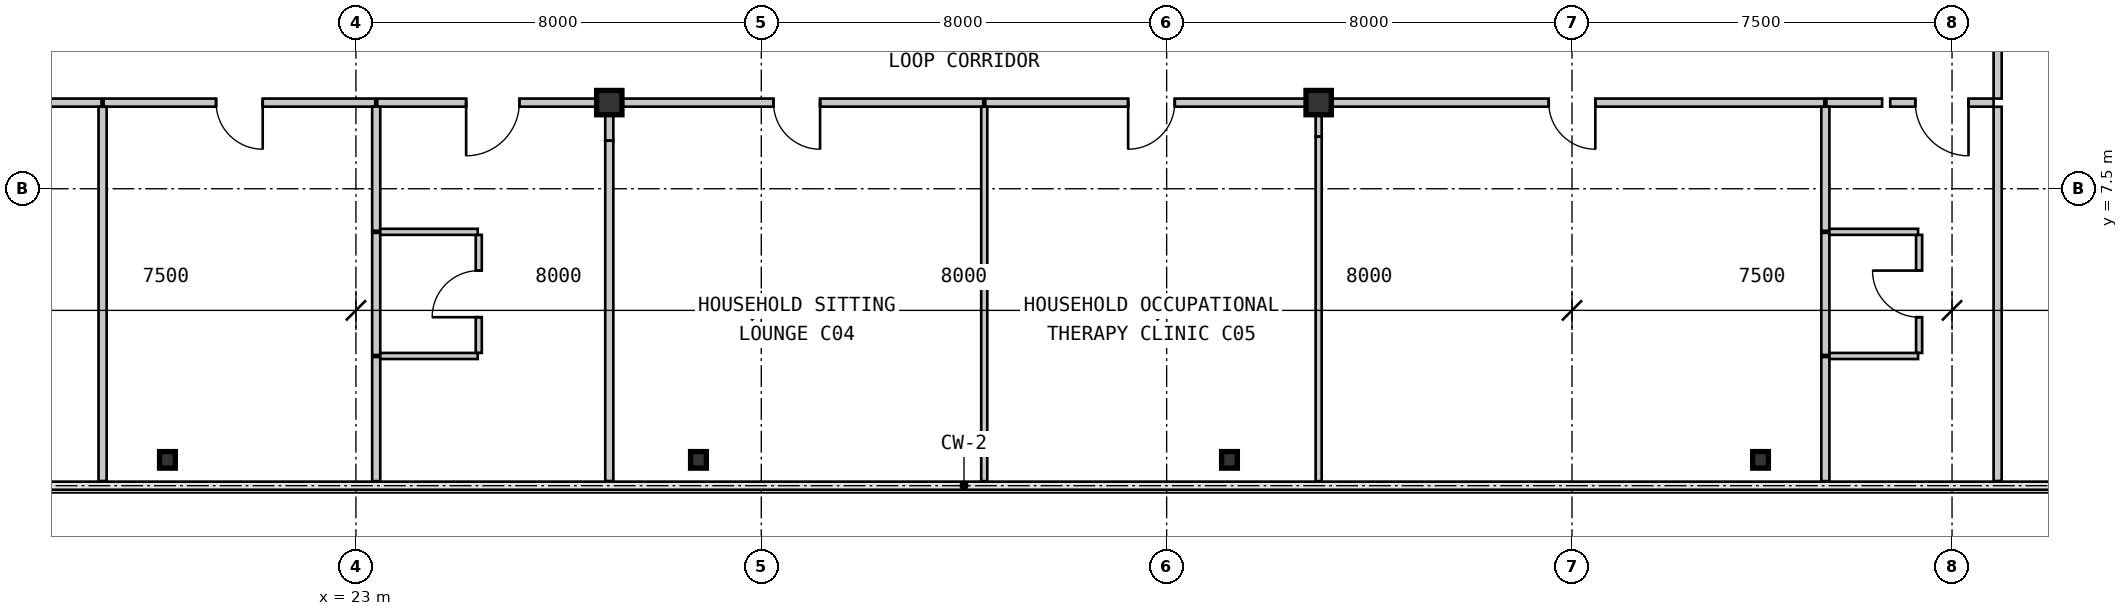
"""IFC4 building model, lengths in metres.
Left out: names, types, materials, properties, quantities, classifications, styles, units other than length and angle.
Written with IfcOpenShell. Run it as: python <this file> out.ifc"""

import sys

from ifc_helpers import new_model, si_unit, direction, frame, frame_2d, origin, origin_2d, place, context, subcontext, project, spatial, rectangle, i_section, extrude, source, transform, mapped, element, fill, save


model = new_model("IFC4")
c1 = context("Model", 3, precision=1e-05, world=origin(), true_north=direction((0.0, 1.0)))
c2 = subcontext(c1, "Body", "Model", "MODEL_VIEW")
j1 = project(units=[si_unit("LENGTHUNIT", "METRE"), si_unit("PLANEANGLEUNIT", "RADIAN")], contexts=[c1])
p1 = place(None, origin())
s1 = spatial("IfcSite", under=j1, at=p1, CompositionType="ELEMENT")
p2 = place(p1, origin())
s2 = spatial("IfcBuilding", under=s1, at=p2, CompositionType="ELEMENT")
p3 = place(p2, frame((0.0, 0.0, 32.55)))
s3 = spatial("IfcBuildingStorey", under=s2, at=p3, CompositionType="ELEMENT", Elevation=32.55)
m1 = source(origin(), c2, "Body", "SweptSolid", [
    extrude(i_section(OverallWidth=0.5, OverallDepth=0.48, WebThickness=0.028, FlangeThickness=0.044, at=origin_2d()), origin(), (0.0, 0.0, 1.0), 3.15),
])
for number, where, z_axis, x_axis in (
    (1, (28.0, 9.2, 0.0), (0.0, 0.0, 1.0), (1.0, 0.0, 0.0)),
    (2, (42.0, 9.2, 0.0), (0.0, 0.0, 1.0), (1.0, 0.0, 0.0)),
):
    element("IfcColumn", number, at=place(p3, frame(where, z_axis=z_axis, x_axis=x_axis)), inside=s3, PredefinedType="COLUMN", context=c2, shape_type="MappedRepresentation", body=[
        mapped(m1, transform((0.0, 0.0, 0.0), scale=1.0)),
    ])
m2 = source(origin(), c2, "Body", "SweptSolid", [
    extrude(i_section(OverallWidth=0.311, OverallDepth=0.327, WebThickness=0.016, FlangeThickness=0.025, at=origin_2d()), origin(), (0.0, 0.0, 1.0), 3.15),
])
for number, where, z_axis, x_axis in (
    (3, (19.28, 2.15, 0.0), (0.0, 0.0, 1.0), (1.0, 0.0, 0.0)),
    (4, (29.76, 2.15, 0.0), (0.0, 0.0, 1.0), (1.0, 0.0, 0.0)),
    (5, (40.24, 2.15, 0.0), (0.0, 0.0, 1.0), (1.0, 0.0, 0.0)),
    (6, (50.72, 2.15, 0.0), (0.0, 0.0, 1.0), (1.0, 0.0, 0.0)),
):
    element("IfcColumn", number, at=place(p3, frame(where, z_axis=z_axis, x_axis=x_axis)), inside=s3, PredefinedType="COLUMN", context=c2, shape_type="MappedRepresentation", body=[
        mapped(m2, transform((0.0, 0.0, 0.0), scale=1.0)),
    ])
m3 = source(origin(), c2, "Body", "SweptSolid", [
    extrude(rectangle(XDim=2.04, YDim=0.16, at=frame_2d((1.02, 0.0))), origin(), (0.0, 0.0, 1.0), 2.93),
])
p4 = place(p3, frame((55.32, 9.2, 0.0), z_axis=(0.0, 0.0, 1.0), x_axis=(-1.0, 0.0, 0.0)))
e7 = element("IfcWall", 7, at=p4, inside=s3, PredefinedType="PARTITIONING", context=c2, shape_type="MappedRepresentation", body=[
    mapped(m3, transform((0.0, 0.0, 0.0), scale=1.0)),
])
m4 = source(origin(), c2, "Body", "SweptSolid", [
    extrude(rectangle(XDim=1.05, YDim=2.1, at=frame_2d((0.525, 1.05))), frame((0.0, 0.09, 0.0), z_axis=(0.0, -1.0, 0.0), x_axis=(1.0, 0.0, 0.0)), (0.0, 0.0, 1.0), 0.18),
])
p5 = place(p4, frame((0.495, 0.0, 0.0)))
e8 = element("IfcOpeningElement", 8, at=p5, cuts=e7, PredefinedType="OPENING", context=c2, shape_type="MappedRepresentation", body=[
    mapped(m4, transform((0.0, 0.0, 0.0), scale=1.0)),
])
m5 = source(origin(), c2, "Body", "SweptSolid", [
    extrude(rectangle(XDim=13.2, YDim=0.16, at=frame_2d((6.6, 0.0))), origin(), (0.0, 0.0, 1.0), 2.93),
])
p6 = place(p3, frame((55.4, 22.48, 0.0), z_axis=(0.0, 0.0, 1.0), x_axis=(0.0, -1.0, 0.0)))
e9 = element("IfcWall", 9, at=p6, inside=s3, PredefinedType="PARTITIONING", context=c2, shape_type="MappedRepresentation", body=[
    mapped(m5, transform((0.0, 0.0, 0.0), scale=1.0)),
])
m6 = source(origin(), c2, "Body", "SweptSolid", [
    extrude(rectangle(XDim=0.92, YDim=2.1, at=frame_2d((0.46, 1.05))), frame((0.0, 0.09, 0.0), z_axis=(0.0, -1.0, 0.0), x_axis=(1.0, 0.0, 0.0)), (0.0, 0.0, 1.0), 0.18),
])
p7 = place(p6, frame((6.14, 0.0, 0.0)))
e10 = element("IfcOpeningElement", 10, at=p7, cuts=e9, PredefinedType="OPENING", context=c2, shape_type="MappedRepresentation", body=[
    mapped(m6, transform((0.0, 0.0, 0.0), scale=1.0)),
])
m7 = source(origin(), c2, "Body", "SweptSolid", [
    extrude(rectangle(XDim=1.1, YDim=0.16, at=frame_2d((0.55, 0.0))), origin(), (0.0, 0.0, 1.0), 2.93),
])
p8 = place(p3, frame((17.98, 9.2, 0.0), z_axis=(0.0, 0.0, 1.0), x_axis=(-1.0, 0.0, 0.0)))
e11 = element("IfcWall", 11, at=p8, inside=s3, PredefinedType="PARTITIONING", context=c2, shape_type="MappedRepresentation", body=[
    mapped(m7, transform((0.0, 0.0, 0.0), scale=1.0)),
])
m8 = source(origin(), c2, "Body", "SweptSolid", [
    extrude(rectangle(XDim=5.36, YDim=0.16, at=frame_2d((2.68, 0.0))), origin(), (0.0, 0.0, 1.0), 2.93),
])
p9 = place(p3, frame((23.38, 9.2, 0.0), z_axis=(0.0, 0.0, 1.0), x_axis=(-1.0, 0.0, 0.0)))
e12 = element("IfcWall", 12, at=p9, inside=s3, PredefinedType="PARTITIONING", context=c2, shape_type="MappedRepresentation", body=[
    mapped(m8, transform((0.0, 0.0, 0.0), scale=1.0)),
])
p10 = place(p9, frame((2.22, 0.0, 0.0)))
e13 = element("IfcOpeningElement", 13, at=p10, cuts=e12, PredefinedType="OPENING", context=c2, shape_type="MappedRepresentation", body=[
    mapped(m6, transform((0.0, 0.0, 0.0), scale=1.0)),
])
m9 = source(origin(), c2, "Body", "SweptSolid", [
    extrude(rectangle(XDim=4.559, YDim=0.16, at=frame_2d((2.28, 0.0))), origin(), (0.0, 0.0, 1.0), 2.93),
])
p11 = place(p3, frame((27.98, 9.2, 0.0), z_axis=(0.0, 0.0, 1.0), x_axis=(-1.0, 0.0, 0.0)))
e14 = element("IfcWall", 14, at=p11, inside=s3, PredefinedType="PARTITIONING", context=c2, shape_type="MappedRepresentation", body=[
    mapped(m9, transform((0.0, 0.0, 0.0), scale=1.0)),
])
p12 = place(p11, frame((1.755, 0.0, 0.0)))
e15 = element("IfcOpeningElement", 15, at=p12, cuts=e14, PredefinedType="OPENING", context=c2, shape_type="MappedRepresentation", body=[
    mapped(m4, transform((0.0, 0.0, 0.0), scale=1.0)),
])
m10 = source(origin(), c2, "Body", "SweptSolid", [
    extrude(rectangle(XDim=7.36, YDim=0.16, at=frame_2d((3.68, 0.0))), origin(), (0.0, 0.0, 1.0), 2.328),
])
p13 = place(p3, frame((35.38, 9.2, 0.0), z_axis=(0.0, 0.0, 1.0), x_axis=(-1.0, 0.0, 0.0)))
e16 = element("IfcWall", 16, at=p13, inside=s3, PredefinedType="PARTITIONING", context=c2, shape_type="MappedRepresentation", body=[
    mapped(m10, transform((0.0, 0.0, 0.0), scale=1.0)),
])
p14 = place(p13, frame((3.22, 0.0, 0.0)))
e17 = element("IfcOpeningElement", 17, at=p14, cuts=e16, PredefinedType="OPENING", context=c2, shape_type="MappedRepresentation", body=[
    mapped(m6, transform((0.0, 0.0, 0.0), scale=1.0)),
])
m11 = source(origin(), c2, "Body", "SweptSolid", [
    extrude(rectangle(XDim=6.56, YDim=0.16, at=frame_2d((3.28, 0.0))), origin(), (0.0, 0.0, 1.0), 2.328),
])
p15 = place(p3, frame((41.98, 9.2, 0.0), z_axis=(0.0, 0.0, 1.0), x_axis=(-1.0, 0.0, 0.0)))
e18 = element("IfcWall", 18, at=p15, inside=s3, PredefinedType="PARTITIONING", context=c2, shape_type="MappedRepresentation", body=[
    mapped(m11, transform((0.0, 0.0, 0.0), scale=1.0)),
])
p16 = place(p15, frame((2.82, 0.0, 0.0)))
e19 = element("IfcOpeningElement", 19, at=p16, cuts=e18, PredefinedType="OPENING", context=c2, shape_type="MappedRepresentation", body=[
    mapped(m6, transform((0.0, 0.0, 0.0), scale=1.0)),
])
m12 = source(origin(), c2, "Body", "SweptSolid", [
    extrude(rectangle(XDim=9.959, YDim=0.16, at=frame_2d((4.98, 0.0))), origin(), (0.0, 0.0, 1.0), 2.93),
])
p17 = place(p3, frame((51.98, 9.2, 0.0), z_axis=(0.0, 0.0, 1.0), x_axis=(-1.0, 0.0, 0.0)))
e20 = element("IfcWall", 20, at=p17, inside=s3, PredefinedType="PARTITIONING", context=c2, shape_type="MappedRepresentation", body=[
    mapped(m12, transform((0.0, 0.0, 0.0), scale=1.0)),
])
p18 = place(p17, frame((4.52, 0.0, 0.0)))
e21 = element("IfcOpeningElement", 21, at=p18, cuts=e20, PredefinedType="OPENING", context=c2, shape_type="MappedRepresentation", body=[
    mapped(m6, transform((0.0, 0.0, 0.0), scale=1.0)),
])
p19 = place(p3, frame((53.12, 9.2, 0.0), z_axis=(0.0, 0.0, 1.0), x_axis=(-1.0, 0.0, 0.0)))
e22 = element("IfcWall", 22, at=p19, inside=s3, PredefinedType="PARTITIONING", context=c2, shape_type="MappedRepresentation", body=[
    mapped(m7, transform((0.0, 0.0, 0.0), scale=1.0)),
])
m13 = source(origin(), c2, "Body", "SweptSolid", [
    extrude(rectangle(XDim=7.386, YDim=0.16, at=frame_2d((3.693, 0.0))), origin(), (0.0, 0.0, 1.0), 2.93),
])
p20 = place(p3, frame((18.0, 9.118, 0.0), z_axis=(0.0, 0.0, 1.0), x_axis=(0.0, -1.0, 0.0)))
e23 = element("IfcWall", 23, at=p20, inside=s3, PredefinedType="PARTITIONING", context=c2, shape_type="MappedRepresentation", body=[
    mapped(m13, transform((0.0, 0.0, 0.0), scale=1.0)),
])
m14 = source(origin(), c2, "Body", "SweptSolid", [
    extrude(rectangle(XDim=2.45, YDim=0.16, at=frame_2d((1.225, 0.0))), origin(), (0.0, 0.0, 1.0), 2.93),
])
p21 = place(p3, frame((23.4, 4.18, 0.0), z_axis=(0.0, 0.0, 1.0), x_axis=(0.0, -1.0, 0.0)))
e24 = element("IfcWall", 24, at=p21, inside=s3, PredefinedType="PARTITIONING", context=c2, shape_type="MappedRepresentation", body=[
    mapped(m14, transform((0.0, 0.0, 0.0), scale=1.0)),
])
m15 = source(origin(), c2, "Body", "SweptSolid", [
    extrude(rectangle(XDim=2.45, YDim=0.16, at=frame_2d((1.225, 0.0))), origin(), (0.0, 0.0, 1.0), 2.93),
])
p22 = place(p3, frame((23.4, 9.12, 0.0), z_axis=(0.0, 0.0, 1.0), x_axis=(0.0, -1.0, 0.0)))
e25 = element("IfcWall", 25, at=p22, inside=s3, PredefinedType="PARTITIONING", context=c2, shape_type="MappedRepresentation", body=[
    mapped(m15, transform((0.0, 0.0, 0.0), scale=1.0)),
])
m16 = source(origin(), c2, "Body", "SweptSolid", [
    extrude(rectangle(XDim=2.41, YDim=0.16, at=frame_2d((1.205, 0.0))), origin(), (0.0, 0.0, 1.0), 2.93),
])
p23 = place(p3, frame((23.4, 6.63, 0.0), z_axis=(0.0, 0.0, 1.0), x_axis=(0.0, -1.0, 0.0)))
e26 = element("IfcWall", 26, at=p23, inside=s3, PredefinedType="PARTITIONING", context=c2, shape_type="MappedRepresentation", body=[
    mapped(m16, transform((0.0, 0.0, 0.0), scale=1.0)),
])
m17 = source(origin(), c2, "Body", "SweptSolid", [
    extrude(rectangle(XDim=2.33, YDim=0.12, at=frame_2d((1.165, 0.0))), origin(), (0.0, 0.0, 1.0), 2.93),
])
p24 = place(p3, frame((25.424, 4.26, 0.0), z_axis=(0.0, 0.0, 1.0), x_axis=(0.0, 1.0, 0.0)))
e27 = element("IfcWall", 27, at=p24, inside=s3, PredefinedType="PARTITIONING", context=c2, shape_type="MappedRepresentation", body=[
    mapped(m17, transform((0.0, 0.0, 0.0), scale=1.0)),
])
m18 = source(origin(), c2, "Body", "SweptSolid", [
    extrude(rectangle(XDim=0.92, YDim=2.1, at=frame_2d((0.46, 1.05))), frame((0.0, 0.07, 0.0), z_axis=(0.0, -1.0, 0.0), x_axis=(1.0, 0.0, 0.0)), (0.0, 0.0, 1.0), 0.14),
])
p25 = place(p24, frame((0.705, 0.0, 0.0)))
e28 = element("IfcOpeningElement", 28, at=p25, cuts=e27, PredefinedType="OPENING", context=c2, shape_type="MappedRepresentation", body=[
    mapped(m18, transform((0.0, 0.0, 0.0), scale=1.0)),
])
m19 = source(origin(), c2, "Body", "SweptSolid", [
    extrude(rectangle(XDim=1.924, YDim=0.12, at=frame_2d((0.962, 0.0))), origin(), (0.0, 0.0, 1.0), 2.93),
])
for number, where, z_axis, x_axis in (
    (29, (23.48, 4.2, 0.0), (0.0, 0.0, 1.0), (1.0, 0.0, 0.0)),
    (30, (25.404, 6.65, 0.0), (0.0, 0.0, 1.0), (-1.0, 0.0, 0.0)),
):
    element("IfcWall", number, at=place(p3, frame(where, z_axis=z_axis, x_axis=x_axis)), inside=s3, PredefinedType="PARTITIONING", context=c2, shape_type="MappedRepresentation", body=[
        mapped(m19, transform((0.0, 0.0, 0.0), scale=1.0)),
    ])
m20 = source(origin(), c2, "Body", "SweptSolid", [
    extrude(rectangle(XDim=0.67, YDim=0.16, at=frame_2d((0.335, 0.0))), origin(), (0.0, 0.0, 1.0), 2.397),
])
p26 = place(p3, frame((28.0, 9.118, 0.0), z_axis=(0.0, 0.0, 1.0), x_axis=(0.0, -1.0, 0.0)))
e31 = element("IfcWall", 31, at=p26, inside=s3, PredefinedType="PARTITIONING", context=c2, shape_type="MappedRepresentation", body=[
    mapped(m20, transform((0.0, 0.0, 0.0), scale=1.0)),
])
m21 = source(origin(), c2, "Body", "SweptSolid", [
    extrude(rectangle(XDim=6.716, YDim=0.16, at=frame_2d((3.358, 0.0))), origin(), (0.0, 0.0, 1.0), 2.93),
])
p27 = place(p3, frame((28.0, 8.448, 0.0), z_axis=(0.0, 0.0, 1.0), x_axis=(0.0, -1.0, 0.0)))
e32 = element("IfcWall", 32, at=p27, inside=s3, PredefinedType="PARTITIONING", context=c2, shape_type="MappedRepresentation", body=[
    mapped(m21, transform((0.0, 0.0, 0.0), scale=1.0)),
])
m22 = source(origin(), c2, "Body", "SweptSolid", [
    extrude(rectangle(XDim=7.39, YDim=0.12, at=frame_2d((3.695, 0.0))), origin(), (0.0, 0.0, 1.0), 2.93),
])
p28 = place(p3, frame((35.4, 9.12, 0.0), z_axis=(0.0, 0.0, 1.0), x_axis=(0.0, -1.0, 0.0)))
e33 = element("IfcWall", 33, at=p28, inside=s3, PredefinedType="PARTITIONING", context=c2, shape_type="MappedRepresentation", body=[
    mapped(m22, transform((0.0, 0.0, 0.0), scale=1.0)),
])
m23 = source(origin(), c2, "Body", "SweptSolid", [
    extrude(rectangle(XDim=0.592, YDim=0.12, at=frame_2d((0.296, 0.0))), origin(), (0.0, 0.0, 1.0), 2.397),
])
p29 = place(p3, frame((42.0, 9.12, 0.0), z_axis=(0.0, 0.0, 1.0), x_axis=(0.0, -1.0, 0.0)))
e34 = element("IfcWall", 34, at=p29, inside=s3, PredefinedType="PARTITIONING", context=c2, shape_type="MappedRepresentation", body=[
    mapped(m23, transform((0.0, 0.0, 0.0), scale=1.0)),
])
m24 = source(origin(), c2, "Body", "SweptSolid", [
    extrude(rectangle(XDim=6.798, YDim=0.12, at=frame_2d((3.399, 0.0))), origin(), (0.0, 0.0, 1.0), 2.93),
])
p30 = place(p3, frame((42.0, 8.528, 0.0), z_axis=(0.0, 0.0, 1.0), x_axis=(0.0, -1.0, 0.0)))
e35 = element("IfcWall", 35, at=p30, inside=s3, PredefinedType="PARTITIONING", context=c2, shape_type="MappedRepresentation", body=[
    mapped(m24, transform((0.0, 0.0, 0.0), scale=1.0)),
])
p31 = place(p3, frame((52.0, 4.18, 0.0), z_axis=(0.0, 0.0, 1.0), x_axis=(0.0, -1.0, 0.0)))
e36 = element("IfcWall", 36, at=p31, inside=s3, PredefinedType="PARTITIONING", context=c2, shape_type="MappedRepresentation", body=[
    mapped(m14, transform((0.0, 0.0, 0.0), scale=1.0)),
])
p32 = place(p3, frame((52.0, 9.12, 0.0), z_axis=(0.0, 0.0, 1.0), x_axis=(0.0, -1.0, 0.0)))
e37 = element("IfcWall", 37, at=p32, inside=s3, PredefinedType="PARTITIONING", context=c2, shape_type="MappedRepresentation", body=[
    mapped(m15, transform((0.0, 0.0, 0.0), scale=1.0)),
])
p33 = place(p3, frame((52.0, 6.63, 0.0), z_axis=(0.0, 0.0, 1.0), x_axis=(0.0, -1.0, 0.0)))
e38 = element("IfcWall", 38, at=p33, inside=s3, PredefinedType="PARTITIONING", context=c2, shape_type="MappedRepresentation", body=[
    mapped(m16, transform((0.0, 0.0, 0.0), scale=1.0)),
])
p34 = place(p3, frame((53.85, 4.26, 0.0), z_axis=(0.0, 0.0, 1.0), x_axis=(0.0, 1.0, 0.0)))
e39 = element("IfcWall", 39, at=p34, inside=s3, PredefinedType="PARTITIONING", context=c2, shape_type="MappedRepresentation", body=[
    mapped(m17, transform((0.0, 0.0, 0.0), scale=1.0)),
])
p35 = place(p34, frame((0.705, 0.0, 0.0)))
e40 = element("IfcOpeningElement", 40, at=p35, cuts=e39, PredefinedType="OPENING", context=c2, shape_type="MappedRepresentation", body=[
    mapped(m18, transform((0.0, 0.0, 0.0), scale=1.0)),
])
m25 = source(origin(), c2, "Body", "SweptSolid", [
    extrude(rectangle(XDim=1.75, YDim=0.12, at=frame_2d((0.875, 0.0))), origin(), (0.0, 0.0, 1.0), 2.93),
])
for number, where, z_axis, x_axis in (
    (41, (52.08, 4.2, 0.0), (0.0, 0.0, 1.0), (1.0, 0.0, 0.0)),
    (42, (53.83, 6.65, 0.0), (0.0, 0.0, 1.0), (-1.0, 0.0, 0.0)),
):
    element("IfcWall", number, at=place(p3, frame(where, z_axis=z_axis, x_axis=x_axis)), inside=s3, PredefinedType="PARTITIONING", context=c2, shape_type="MappedRepresentation", body=[
        mapped(m25, transform((0.0, 0.0, 0.0), scale=1.0)),
    ])
p36 = place(p3, frame((55.4, 9.118, 0.0), z_axis=(0.0, 0.0, 1.0), x_axis=(0.0, -1.0, 0.0)))
e43 = element("IfcWall", 43, at=p36, inside=s3, PredefinedType="PARTITIONING", context=c2, shape_type="MappedRepresentation", body=[
    mapped(m13, transform((0.0, 0.0, 0.0), scale=1.0)),
])
m26 = source(origin(), c2, "Body", "SweptSolid", [
    extrude(rectangle(XDim=1.05, YDim=2.1, at=frame_2d((0.525, 1.05))), frame((0.0, 0.025, 0.0), z_axis=(0.0, -1.0, 0.0), x_axis=(1.0, 0.0, 0.0)), (0.0, 0.0, 1.0), 0.05),
])
p37 = place(p5, origin())
e44 = element("IfcDoor", 44, at=p37, inside=s3, OperationType="SINGLE_SWING_LEFT", PredefinedType="DOOR", context=c2, shape_type="MappedRepresentation", body=[
    mapped(m26, transform((0.0, 0.0, 0.0), scale=1.0)),
])
fill(e8, e44)
m27 = source(origin(), c2, "Body", "SweptSolid", [
    extrude(rectangle(XDim=0.92, YDim=2.1, at=frame_2d((0.46, 1.05))), frame((0.0, 0.025, 0.0), z_axis=(0.0, -1.0, 0.0), x_axis=(1.0, 0.0, 0.0)), (0.0, 0.0, 1.0), 0.05),
])
p38 = place(p10, origin())
e45 = element("IfcDoor", 45, at=p38, inside=s3, OperationType="SINGLE_SWING_LEFT", PredefinedType="DOOR", context=c2, shape_type="MappedRepresentation", body=[
    mapped(m27, transform((0.0, 0.0, 0.0), scale=1.0)),
])
fill(e13, e45)
p39 = place(p12, origin())
e46 = element("IfcDoor", 46, at=p39, inside=s3, OperationType="SINGLE_SWING_RIGHT", PredefinedType="DOOR", context=c2, shape_type="MappedRepresentation", body=[
    mapped(m26, transform((0.0, 0.0, 0.0), scale=1.0)),
])
fill(e15, e46)
p40 = place(p14, origin())
e47 = element("IfcDoor", 47, at=p40, inside=s3, OperationType="SINGLE_SWING_LEFT", PredefinedType="DOOR", context=c2, shape_type="MappedRepresentation", body=[
    mapped(m27, transform((0.0, 0.0, 0.0), scale=1.0)),
])
fill(e17, e47)
p41 = place(p16, origin())
e48 = element("IfcDoor", 48, at=p41, inside=s3, OperationType="SINGLE_SWING_RIGHT", PredefinedType="DOOR", context=c2, shape_type="MappedRepresentation", body=[
    mapped(m27, transform((0.0, 0.0, 0.0), scale=1.0)),
])
fill(e19, e48)
p42 = place(p18, origin())
e49 = element("IfcDoor", 49, at=p42, inside=s3, OperationType="SINGLE_SWING_LEFT", PredefinedType="DOOR", context=c2, shape_type="MappedRepresentation", body=[
    mapped(m27, transform((0.0, 0.0, 0.0), scale=1.0)),
])
fill(e21, e49)
p43 = place(p25, origin())
e50 = element("IfcDoor", 50, at=p43, inside=s3, OperationType="SINGLE_SWING_LEFT", PredefinedType="DOOR", context=c2, shape_type="MappedRepresentation", body=[
    mapped(m27, transform((0.0, 0.0, 0.0), scale=1.0)),
])
fill(e28, e50)
p44 = place(p35, origin())
e51 = element("IfcDoor", 51, at=p44, inside=s3, OperationType="SINGLE_SWING_RIGHT", PredefinedType="DOOR", context=c2, shape_type="MappedRepresentation", body=[
    mapped(m27, transform((0.0, 0.0, 0.0), scale=1.0)),
])
fill(e40, e51)
save(model, sys.argv[1])
